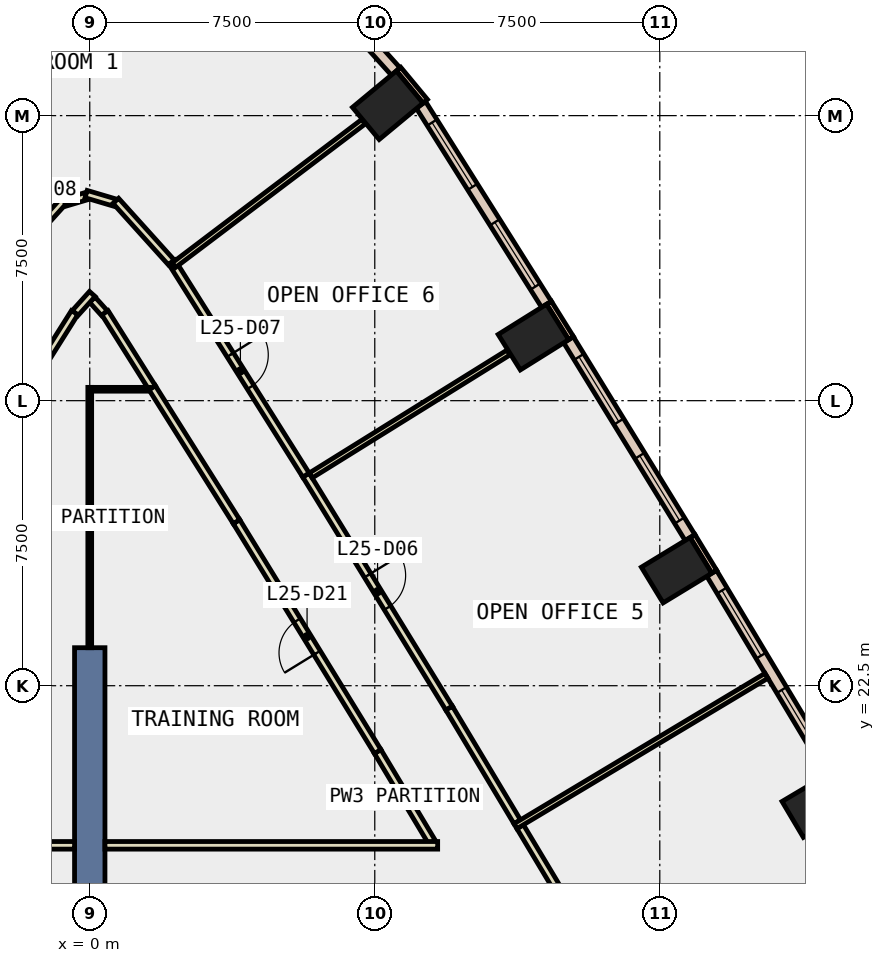
"""IFC4 building model, lengths in metres.
Left out: names, types, materials, properties, quantities, classifications, styles, units other than length and angle.
Written with IfcOpenShell. Run it as: python <this file> out.ifc"""

import sys

from ifc_helpers import new_model, si_unit, direction, frame, frame_2d, origin, origin_2d, place, context, subcontext, project, spatial, rectangle, extrude, element, fill, save


model = new_model("IFC4")
c1 = context("Model", 3, precision=1e-05, world=origin(), true_north=direction((0.0, 1.0)))
c2 = subcontext(c1, "Body", "Model", "MODEL_VIEW")
j1 = project(units=[si_unit("LENGTHUNIT", "METRE"), si_unit("PLANEANGLEUNIT", "RADIAN")], contexts=[c1])
p1 = place(None, origin())
s1 = spatial("IfcSite", under=j1, at=p1, CompositionType="ELEMENT")
p2 = place(p1, origin())
s2 = spatial("IfcBuilding", under=s1, at=p2, CompositionType="ELEMENT")
p3 = place(p2, frame((0.0, 0.0, 116.0)))
s3 = spatial("IfcBuildingStorey", under=s2, at=p3, CompositionType="ELEMENT", Elevation=116.0)
for number, where, z_axis, x_axis in (
    (1, (19.143, 19.364, -0.4), (0.0, 0.0, 1.0), (-0.51, 0.86, 0.0)),
    (2, (15.442, 25.539, -0.4), (0.0, 0.0, 1.0), (-0.52, 0.854, 0.0)),
    (3, (11.675, 31.673, -0.4), (0.0, 0.0, 1.0), (-0.53, 0.848, 0.0)),
    (4, (7.842, 37.774, -0.4), (0.0, 0.0, 1.0), (-0.638, 0.77, 0.0)),
):
    element("IfcColumn", number, at=place(p3, frame(where, z_axis=z_axis, x_axis=x_axis)), inside=s3, PredefinedType="COLUMN", context=c2, shape_type="SweptSolid", body=[
        extrude(rectangle(XDim=1.1, YDim=1.5, at=origin_2d()), origin(), (0.0, 0.0, 1.0), 4.2),
    ])
p4 = place(p3, frame((0.0, 14.5, -0.4), z_axis=(0.0, 0.0, 1.0), x_axis=(0.0, 1.0, 0.0)))
e5 = element("IfcWall", 5, at=p4, inside=s3, PredefinedType="SHEAR", context=c2, shape_type="SweptSolid", body=[
    extrude(rectangle(XDim=9.0, YDim=0.8, at=frame_2d((4.5, 0.0))), origin(), (0.0, 0.0, 1.0), 4.2),
])
p5 = place(p3, frame((16.433, 25.498, 0.0), z_axis=(0.0, 0.0, 1.0), x_axis=(-0.519869515594, 0.854245682901, 0.0)))
e6 = element("IfcWall", 6, at=p5, inside=s3, PredefinedType="STANDARD", context=c2, shape_type="SweptSolid", body=[
    extrude(rectangle(XDim=1.1, YDim=0.15, at=frame_2d((0.55, 0.0))), origin(), (0.0, 0.0, 1.0), 3.8),
])
p6 = place(p3, frame((12.666, 31.644, 0.0), z_axis=(0.0, 0.0, 1.0), x_axis=(-0.52997899071, 0.848010771987, 0.0)))
e7 = element("IfcWall", 7, at=p6, inside=s3, PredefinedType="STANDARD", context=c2, shape_type="SweptSolid", body=[
    extrude(rectangle(XDim=1.1, YDim=0.15, at=frame_2d((0.55, 0.0))), origin(), (0.0, 0.0, 1.0), 3.8),
])
p7 = place(p3, frame((8.828, 37.878, 0.0), z_axis=(0.0, 0.0, 1.0), x_axis=(-0.638435351024, 0.769675452748, 0.0)))
e8 = element("IfcWall", 8, at=p7, inside=s3, PredefinedType="STANDARD", context=c2, shape_type="SweptSolid", body=[
    extrude(rectangle(XDim=1.099, YDim=0.15, at=frame_2d((0.55, 0.0))), origin(), (0.0, 0.0, 1.0), 3.8),
])
p8 = place(p3, frame((19.506, 20.217, 0.0), z_axis=(0.0, 0.0, 1.0), x_axis=(-0.514078503149, 0.857743139057, 0.0)))
e9 = element("IfcWall", 9, at=p8, inside=s3, PredefinedType="STANDARD", context=c2, shape_type="SweptSolid", body=[
    extrude(rectangle(XDim=6.11, YDim=0.3, at=frame_2d((3.055, 0.0))), origin(), (0.0, 0.0, 1.0), 3.8),
])
p9 = place(p8, frame((0.528, 0.0, 0.9)))
e10 = element("IfcOpeningElement", 10, at=p9, cuts=e9, PredefinedType="OPENING", context=c2, shape_type="SweptSolid", body=[
    extrude(rectangle(XDim=2.0, YDim=2.6, at=frame_2d((1.0, 1.3))), frame((0.0, 0.16, 0.0), z_axis=(0.0, -1.0, 0.0), x_axis=(1.0, 0.0, 0.0)), (0.0, 0.0, 1.0), 0.32),
])
p10 = place(p8, frame((3.583, 0.0, 0.9)))
e11 = element("IfcOpeningElement", 11, at=p10, cuts=e9, PredefinedType="OPENING", context=c2, shape_type="SweptSolid", body=[
    extrude(rectangle(XDim=2.0, YDim=2.6, at=frame_2d((1.0, 1.3))), frame((0.0, 0.16, 0.0), z_axis=(0.0, -1.0, 0.0), x_axis=(1.0, 0.0, 0.0)), (0.0, 0.0, 1.0), 0.32),
])
p11 = place(p3, frame((15.796, 26.397, 0.0), z_axis=(0.0, 0.0, 1.0), x_axis=(-0.523417276981, 0.852076495485, 0.0)))
e12 = element("IfcWall", 12, at=p11, inside=s3, PredefinedType="STANDARD", context=c2, shape_type="SweptSolid", body=[
    extrude(rectangle(XDim=6.11, YDim=0.3, at=frame_2d((3.055, 0.0))), origin(), (0.0, 0.0, 1.0), 3.8),
])
p12 = place(p11, frame((0.527, 0.0, 0.9)))
e13 = element("IfcOpeningElement", 13, at=p12, cuts=e12, PredefinedType="OPENING", context=c2, shape_type="SweptSolid", body=[
    extrude(rectangle(XDim=2.0, YDim=2.6, at=frame_2d((1.0, 1.3))), frame((0.0, 0.16, 0.0), z_axis=(0.0, -1.0, 0.0), x_axis=(1.0, 0.0, 0.0)), (0.0, 0.0, 1.0), 0.32),
])
p13 = place(p11, frame((3.582, 0.0, 0.9)))
e14 = element("IfcOpeningElement", 14, at=p13, cuts=e12, PredefinedType="OPENING", context=c2, shape_type="SweptSolid", body=[
    extrude(rectangle(XDim=2.0, YDim=2.6, at=frame_2d((1.0, 1.3))), frame((0.0, 0.16, 0.0), z_axis=(0.0, -1.0, 0.0), x_axis=(1.0, 0.0, 0.0)), (0.0, 0.0, 1.0), 0.32),
])
p14 = place(p3, frame((12.018, 32.535, 0.0), z_axis=(0.0, 0.0, 1.0), x_axis=(-0.532699467907, 0.846304482377, 0.0)))
e15 = element("IfcWall", 15, at=p14, inside=s3, PredefinedType="STANDARD", context=c2, shape_type="SweptSolid", body=[
    extrude(rectangle(XDim=6.202, YDim=0.3, at=frame_2d((3.101, 0.0))), origin(), (0.0, 0.0, 1.0), 3.8),
])
p15 = place(p14, frame((0.551, 0.0, 0.9)))
e16 = element("IfcOpeningElement", 16, at=p15, cuts=e15, PredefinedType="OPENING", context=c2, shape_type="SweptSolid", body=[
    extrude(rectangle(XDim=2.0, YDim=2.6, at=frame_2d((1.0, 1.3))), frame((0.0, 0.16, 0.0), z_axis=(0.0, -1.0, 0.0), x_axis=(1.0, 0.0, 0.0)), (0.0, 0.0, 1.0), 0.32),
])
p16 = place(p14, frame((3.652, 0.0, 0.9)))
e17 = element("IfcOpeningElement", 17, at=p16, cuts=e15, PredefinedType="OPENING", context=c2, shape_type="SweptSolid", body=[
    extrude(rectangle(XDim=2.0, YDim=2.6, at=frame_2d((1.0, 1.3))), frame((0.0, 0.16, 0.0), z_axis=(0.0, -1.0, 0.0), x_axis=(1.0, 0.0, 0.0)), (0.0, 0.0, 1.0), 0.32),
])
p17 = place(p3, frame((8.052, 38.661, 0.0), z_axis=(0.0, 0.0, 1.0), x_axis=(-0.66966434159, 0.742663900834, 0.0)))
e18 = element("IfcWall", 18, at=p17, inside=s3, PredefinedType="STANDARD", context=c2, shape_type="SweptSolid", body=[
    extrude(rectangle(XDim=3.893, YDim=0.3, at=frame_2d((1.946, 0.0))), origin(), (0.0, 0.0, 1.0), 3.8),
])
p18 = place(p17, frame((1.246, 0.0, 0.9)))
e19 = element("IfcOpeningElement", 19, at=p18, cuts=e18, PredefinedType="OPENING", context=c2, shape_type="SweptSolid", body=[
    extrude(rectangle(XDim=1.4, YDim=2.6, at=frame_2d((0.7, 1.3))), frame((0.0, 0.16, 0.0), z_axis=(0.0, -1.0, 0.0), x_axis=(1.0, 0.0, 0.0)), (0.0, 0.0, 1.0), 0.32),
])
p19 = place(p3, frame((9.003, 18.386, 0.0), z_axis=(0.0, 0.0, 1.0), x_axis=(-0.513900868925, 0.857849577092, 0.0)))
e20 = element("IfcWall", 20, at=p19, inside=s3, PredefinedType="PARTITIONING", context=c2, shape_type="SweptSolid", body=[
    extrude(rectangle(XDim=2.777, YDim=0.2, at=frame_2d((1.388, 0.0))), origin(), (0.0, 0.0, 1.0), 3.8),
])
p20 = place(p3, frame((7.576, 20.768, 0.0), z_axis=(0.0, 0.0, 1.0), x_axis=(-0.523390991338, 0.852092641786, 0.0)))
e21 = element("IfcWall", 21, at=p20, inside=s3, PredefinedType="PARTITIONING", context=c2, shape_type="SweptSolid", body=[
    extrude(rectangle(XDim=7.098, YDim=0.2, at=frame_2d((3.549, 0.0))), origin(), (0.0, 0.0, 1.0), 3.8),
])
p21 = place(p20, frame((3.049, 0.0, 0.0)))
e22 = element("IfcOpeningElement", 22, at=p21, cuts=e21, PredefinedType="OPENING", context=c2, shape_type="SweptSolid", body=[
    extrude(rectangle(XDim=1.0, YDim=2.1, at=frame_2d((0.5, 1.05))), frame((0.0, 0.11, 0.0), z_axis=(0.0, -1.0, 0.0), x_axis=(1.0, 0.0, 0.0)), (0.0, 0.0, 1.0), 0.22),
])
p22 = place(p3, frame((3.861, 26.816, 0.0), z_axis=(0.0, 0.0, 1.0), x_axis=(-0.532782188792, 0.846252408745, 0.0)))
e23 = element("IfcWall", 23, at=p22, inside=s3, PredefinedType="PARTITIONING", context=c2, shape_type="SweptSolid", body=[
    extrude(rectangle(XDim=4.167, YDim=0.2, at=frame_2d((2.083, 0.0))), origin(), (0.0, 0.0, 1.0), 3.8),
])
p23 = place(p3, frame((1.641, 30.342, 0.0), z_axis=(0.0, 0.0, 1.0), x_axis=(-0.532732797088, 0.846283502679, 0.0)))
e24 = element("IfcWall", 24, at=p23, inside=s3, PredefinedType="PARTITIONING", context=c2, shape_type="SweptSolid", body=[
    extrude(rectangle(XDim=2.333, YDim=0.2, at=frame_2d((1.167, 0.0))), origin(), (0.0, 0.0, 1.0), 3.8),
])
p24 = place(p3, frame((0.384, 32.306, 0.0), z_axis=(0.0, 0.0, 1.0), x_axis=(-0.669306261406, 0.742986627365, 0.0)))
e25 = element("IfcWall", 25, at=p24, inside=s3, PredefinedType="PARTITIONING", context=c2, shape_type="SweptSolid", body=[
    extrude(rectangle(XDim=0.474, YDim=0.2, at=frame_2d((0.237, 0.0))), origin(), (0.0, 0.0, 1.0), 3.8),
])
p25 = place(p3, frame((0.067, 32.807, 0.0), z_axis=(0.0, 0.0, 1.0), x_axis=(-0.66900475403, -0.74325812413, 0.0)))
e26 = element("IfcWall", 26, at=p25, inside=s3, PredefinedType="PARTITIONING", context=c2, shape_type="SweptSolid", body=[
    extrude(rectangle(XDim=0.674, YDim=0.2, at=frame_2d((0.337, 0.0))), origin(), (0.0, 0.0, 1.0), 3.8),
])
p26 = place(p3, frame((-0.398, 32.317, 0.0), z_axis=(0.0, 0.0, 1.0), x_axis=(-0.53276445777, -0.846263571553, 0.0)))
e27 = element("IfcWall", 27, at=p26, inside=s3, PredefinedType="PARTITIONING", context=c2, shape_type="SweptSolid", body=[
    extrude(rectangle(XDim=6.5, YDim=0.2, at=frame_2d((3.25, 0.0))), origin(), (0.0, 0.0, 1.0), 3.8),
])
p27 = place(p3, frame((11.326, 18.79, 0.0), z_axis=(0.0, 0.0, 1.0), x_axis=(0.514155958966, -0.857696712049, 0.0)))
e28 = element("IfcWall", 28, at=p27, inside=s3, PredefinedType="PARTITIONING", context=c2, shape_type="SweptSolid", body=[
    extrude(rectangle(XDim=3.487, YDim=0.2, at=frame_2d((1.744, 0.0))), origin(), (0.0, 0.0, 1.0), 3.8),
])
p28 = place(p3, frame((5.69, 28.042, 0.0), z_axis=(0.0, 0.0, 1.0), x_axis=(0.523381868706, -0.852098245222, 0.0)))
e29 = element("IfcWall", 29, at=p28, inside=s3, PredefinedType="PARTITIONING", context=c2, shape_type="SweptSolid", body=[
    extrude(rectangle(XDim=7.198, YDim=0.2, at=frame_2d((3.599, 0.0))), origin(), (0.0, 0.0, 1.0), 3.8),
])
p29 = place(p28, frame((3.099, 0.0, 0.0)))
e30 = element("IfcOpeningElement", 30, at=p29, cuts=e29, PredefinedType="OPENING", context=c2, shape_type="SweptSolid", body=[
    extrude(rectangle(XDim=1.0, YDim=2.1, at=frame_2d((0.5, 1.05))), frame((0.0, 0.11, 0.0), z_axis=(0.0, -1.0, 0.0), x_axis=(1.0, 0.0, 0.0)), (0.0, 0.0, 1.0), 0.22),
])
p30 = place(p3, frame((9.457, 21.909, 0.0), z_axis=(0.0, 0.0, 1.0), x_axis=(0.513949903813, -0.857820200491, 0.0)))
e31 = element("IfcWall", 31, at=p30, inside=s3, PredefinedType="PARTITIONING", context=c2, shape_type="SweptSolid", body=[
    extrude(rectangle(XDim=3.487, YDim=0.2, at=frame_2d((1.743, 0.0))), origin(), (0.0, 0.0, 1.0), 3.8),
])
p31 = place(p3, frame((2.159, 33.649, 0.0), z_axis=(0.0, 0.0, 1.0), x_axis=(0.532784927572, -0.846250684462, 0.0)))
e32 = element("IfcWall", 32, at=p31, inside=s3, PredefinedType="PARTITIONING", context=c2, shape_type="SweptSolid", body=[
    extrude(rectangle(XDim=6.626, YDim=0.2, at=frame_2d((3.313, 0.0))), origin(), (0.0, 0.0, 1.0), 3.8),
])
p32 = place(p31, frame((2.888, 0.0, 0.0)))
e33 = element("IfcOpeningElement", 33, at=p32, cuts=e32, PredefinedType="OPENING", context=c2, shape_type="SweptSolid", body=[
    extrude(rectangle(XDim=1.0, YDim=2.1, at=frame_2d((0.5, 1.05))), frame((0.0, 0.11, 0.0), z_axis=(0.0, -1.0, 0.0), x_axis=(1.0, 0.0, 0.0)), (0.0, 0.0, 1.0), 0.22),
])
p33 = place(p3, frame((-2.145, 33.639, 0.0), z_axis=(0.0, 0.0, 1.0), x_axis=(0.66965737341, 0.742670184023, 0.0)))
e34 = element("IfcWall", 34, at=p33, inside=s3, PredefinedType="PARTITIONING", context=c2, shape_type="SweptSolid", body=[
    extrude(rectangle(XDim=2.18, YDim=0.2, at=frame_2d((1.09, 0.0))), origin(), (0.0, 0.0, 1.0), 3.8),
])
p34 = place(p33, frame((0.59, 0.0, 0.0)))
e35 = element("IfcOpeningElement", 35, at=p34, cuts=e34, PredefinedType="OPENING", context=c2, shape_type="SweptSolid", body=[
    extrude(rectangle(XDim=1.0, YDim=2.1, at=frame_2d((0.5, 1.05))), frame((0.0, 0.11, 0.0), z_axis=(0.0, -1.0, 0.0), x_axis=(1.0, 0.0, 0.0)), (0.0, 0.0, 1.0), 0.22),
])
p35 = place(p3, frame((-0.656, 35.213, 0.0), z_axis=(0.0, 0.0, 1.0), x_axis=(0.958764375257, 0.284202168777, 0.0)))
e36 = element("IfcWall", 36, at=p35, inside=s3, PredefinedType="PARTITIONING", context=c2, shape_type="SweptSolid", body=[
    extrude(rectangle(XDim=0.584, YDim=0.2, at=frame_2d((0.292, 0.0))), origin(), (0.0, 0.0, 1.0), 3.8),
])
p36 = place(p3, frame((-0.096, 35.436, 0.0), z_axis=(0.0, 0.0, 1.0), x_axis=(0.95867870552, -0.284491018456, 0.0)))
e37 = element("IfcWall", 37, at=p36, inside=s3, PredefinedType="PARTITIONING", context=c2, shape_type="SweptSolid", body=[
    extrude(rectangle(XDim=0.784, YDim=0.2, at=frame_2d((0.392, 0.0))), origin(), (0.0, 0.0, 1.0), 3.8),
])
p37 = place(p3, frame((0.685, 35.258, 0.0), z_axis=(0.0, 0.0, 1.0), x_axis=(0.66965737341, -0.742670184023, 0.0)))
e38 = element("IfcWall", 38, at=p37, inside=s3, PredefinedType="PARTITIONING", context=c2, shape_type="SweptSolid", body=[
    extrude(rectangle(XDim=2.18, YDim=0.2, at=frame_2d((1.09, 0.0))), origin(), (0.0, 0.0, 1.0), 3.8),
])
for number, where, z_axis, x_axis in (
    (39, (0.4, 18.3, 0.0), (0.0, 0.0, 1.0), (1.0, 0.0, 0.0)),
    (40, (-9.155, 18.3, 0.0), (0.0, 0.0, 1.0), (1.0, 0.0, 0.0)),
):
    element("IfcWall", number, at=place(p3, frame(where, z_axis=z_axis, x_axis=x_axis)), inside=s3, PredefinedType="PARTITIONING", context=c2, shape_type="SweptSolid", body=[
        extrude(rectangle(XDim=8.755, YDim=0.2, at=frame_2d((4.377, 0.0))), origin(), (0.0, 0.0, 1.0), 3.8),
    ])
p38 = place(p3, frame((0.0, 23.5, 0.0), z_axis=(0.0, 0.0, 1.0), x_axis=(0.0, 1.0, 0.0)))
e41 = element("IfcWall", 41, at=p38, inside=s3, PredefinedType="PARTITIONING", context=c2, shape_type="SweptSolid", body=[
    extrude(rectangle(XDim=6.85, YDim=0.1, at=frame_2d((3.425, 0.0))), origin(), (0.0, 0.0, 1.0), 3.8),
])
p39 = place(p3, frame((0.05, 30.3, 0.0), z_axis=(0.0, 0.0, 1.0), x_axis=(1.0, 0.0, 0.0)))
e42 = element("IfcWall", 42, at=p39, inside=s3, PredefinedType="PARTITIONING", context=c2, shape_type="SweptSolid", body=[
    extrude(rectangle(XDim=1.518, YDim=0.1, at=frame_2d((0.759, 0.0))), origin(), (0.0, 0.0, 1.0), 3.8),
])
p40 = place(p3, frame((11.202, 18.803, 0.0), z_axis=(0.0, 0.0, 1.0), x_axis=(0.857778149162, 0.514020084062, 0.0)))
e43 = element("IfcWall", 43, at=p40, inside=s3, PredefinedType="PARTITIONING", context=c2, shape_type="SweptSolid", body=[
    extrude(rectangle(XDim=7.7, YDim=0.15, at=frame_2d((3.85, 0.0))), origin(), (0.0, 0.0, 1.0), 3.8),
])
p41 = place(p3, frame((5.814, 28.031, 0.0), z_axis=(0.0, 0.0, 1.0), x_axis=(0.849222099047, 0.528035819324, 0.0)))
e44 = element("IfcWall", 44, at=p41, inside=s3, PredefinedType="PARTITIONING", context=c2, shape_type="SweptSolid", body=[
    extrude(rectangle(XDim=6.13, YDim=0.15, at=frame_2d((3.065, 0.0))), origin(), (0.0, 0.0, 1.0), 3.8),
])
p42 = place(p3, frame((2.212, 33.565, 0.0), z_axis=(0.0, 0.0, 1.0), x_axis=(0.797488074979, 0.603334708322, 0.0)))
e45 = element("IfcWall", 45, at=p42, inside=s3, PredefinedType="PARTITIONING", context=c2, shape_type="SweptSolid", body=[
    extrude(rectangle(XDim=6.257, YDim=0.15, at=frame_2d((3.128, 0.0))), origin(), (0.0, 0.0, 1.0), 3.8),
])
p43 = place(p9, origin())
e46 = element("IfcWindow", 46, at=p43, inside=s3, PartitioningType="SINGLE_PANEL", PredefinedType="WINDOW", context=c2, shape_type="SweptSolid", body=[
    extrude(rectangle(XDim=2.0, YDim=2.6, at=frame_2d((1.0, 1.3))), frame((0.0, 0.03, 0.0), z_axis=(0.0, -1.0, 0.0), x_axis=(1.0, 0.0, 0.0)), (0.0, 0.0, 1.0), 0.06),
])
fill(e10, e46)
p44 = place(p10, origin())
e47 = element("IfcWindow", 47, at=p44, inside=s3, PartitioningType="SINGLE_PANEL", PredefinedType="WINDOW", context=c2, shape_type="SweptSolid", body=[
    extrude(rectangle(XDim=2.0, YDim=2.6, at=frame_2d((1.0, 1.3))), frame((0.0, 0.03, 0.0), z_axis=(0.0, -1.0, 0.0), x_axis=(1.0, 0.0, 0.0)), (0.0, 0.0, 1.0), 0.06),
])
fill(e11, e47)
p45 = place(p12, origin())
e48 = element("IfcWindow", 48, at=p45, inside=s3, PartitioningType="SINGLE_PANEL", PredefinedType="WINDOW", context=c2, shape_type="SweptSolid", body=[
    extrude(rectangle(XDim=2.0, YDim=2.6, at=frame_2d((1.0, 1.3))), frame((0.0, 0.03, 0.0), z_axis=(0.0, -1.0, 0.0), x_axis=(1.0, 0.0, 0.0)), (0.0, 0.0, 1.0), 0.06),
])
fill(e13, e48)
p46 = place(p13, origin())
e49 = element("IfcWindow", 49, at=p46, inside=s3, PartitioningType="SINGLE_PANEL", PredefinedType="WINDOW", context=c2, shape_type="SweptSolid", body=[
    extrude(rectangle(XDim=2.0, YDim=2.6, at=frame_2d((1.0, 1.3))), frame((0.0, 0.03, 0.0), z_axis=(0.0, -1.0, 0.0), x_axis=(1.0, 0.0, 0.0)), (0.0, 0.0, 1.0), 0.06),
])
fill(e14, e49)
p47 = place(p15, origin())
e50 = element("IfcWindow", 50, at=p47, inside=s3, PartitioningType="SINGLE_PANEL", PredefinedType="WINDOW", context=c2, shape_type="SweptSolid", body=[
    extrude(rectangle(XDim=2.0, YDim=2.6, at=frame_2d((1.0, 1.3))), frame((0.0, 0.03, 0.0), z_axis=(0.0, -1.0, 0.0), x_axis=(1.0, 0.0, 0.0)), (0.0, 0.0, 1.0), 0.06),
])
fill(e16, e50)
p48 = place(p16, origin())
e51 = element("IfcWindow", 51, at=p48, inside=s3, PartitioningType="SINGLE_PANEL", PredefinedType="WINDOW", context=c2, shape_type="SweptSolid", body=[
    extrude(rectangle(XDim=2.0, YDim=2.6, at=frame_2d((1.0, 1.3))), frame((0.0, 0.03, 0.0), z_axis=(0.0, -1.0, 0.0), x_axis=(1.0, 0.0, 0.0)), (0.0, 0.0, 1.0), 0.06),
])
fill(e17, e51)
p49 = place(p29, origin())
e52 = element("IfcDoor", 52, at=p49, inside=s3, OperationType="SINGLE_SWING_LEFT", PredefinedType="DOOR", context=c2, shape_type="SweptSolid", body=[
    extrude(rectangle(XDim=1.0, YDim=2.1, at=frame_2d((0.5, 1.05))), frame((0.0, 0.025, 0.0), z_axis=(0.0, -1.0, 0.0), x_axis=(1.0, 0.0, 0.0)), (0.0, 0.0, 1.0), 0.05),
])
fill(e30, e52)
p50 = place(p32, origin())
e53 = element("IfcDoor", 53, at=p50, inside=s3, OperationType="SINGLE_SWING_LEFT", PredefinedType="DOOR", context=c2, shape_type="SweptSolid", body=[
    extrude(rectangle(XDim=1.0, YDim=2.1, at=frame_2d((0.5, 1.05))), frame((0.0, 0.025, 0.0), z_axis=(0.0, -1.0, 0.0), x_axis=(1.0, 0.0, 0.0)), (0.0, 0.0, 1.0), 0.05),
])
fill(e33, e53)
p51 = place(p21, origin())
e54 = element("IfcDoor", 54, at=p51, inside=s3, OperationType="SINGLE_SWING_LEFT", PredefinedType="DOOR", context=c2, shape_type="SweptSolid", body=[
    extrude(rectangle(XDim=1.0, YDim=2.1, at=frame_2d((0.5, 1.05))), frame((0.0, 0.025, 0.0), z_axis=(0.0, -1.0, 0.0), x_axis=(1.0, 0.0, 0.0)), (0.0, 0.0, 1.0), 0.05),
])
fill(e22, e54)
save(model, sys.argv[1])
